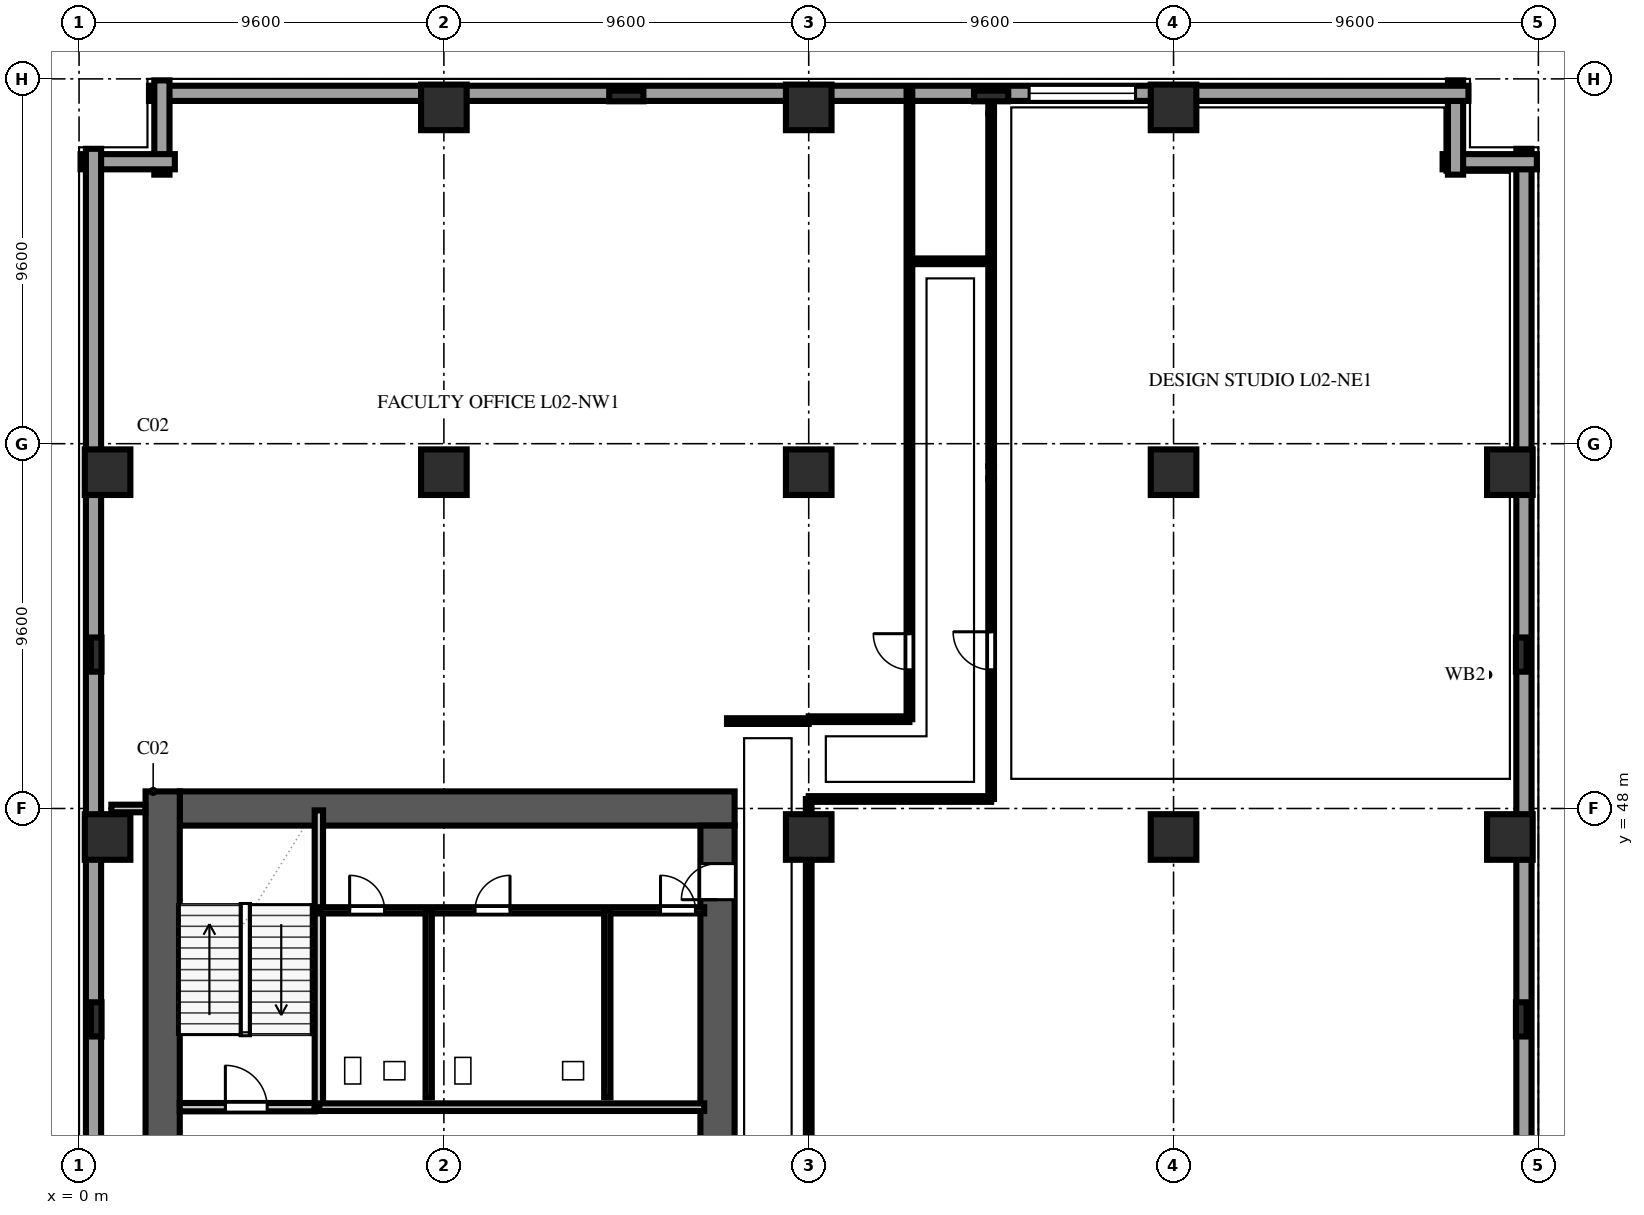
"""IFC4 building model, lengths in metres.
Left out: names, types, materials, properties, quantities, classifications, styles, units other than length and angle.
Written with IfcOpenShell. Run it as: python <this file> out.ifc"""

import sys

from ifc_helpers import new_model, si_unit, direction, frame, frame_2d, origin, origin_2d, place, context, subcontext, project, spatial, rectangle, extrude, element, fill, save


model = new_model("IFC4")
c1 = context("Model", 3, precision=1e-05, world=origin(), true_north=direction((0.0, 1.0)))
c2 = subcontext(c1, "Body", "Model", "MODEL_VIEW")
j1 = project(units=[si_unit("LENGTHUNIT", "METRE"), si_unit("PLANEANGLEUNIT", "RADIAN")], contexts=[c1])
p1 = place(None, origin())
s1 = spatial("IfcSite", under=j1, at=p1, CompositionType="ELEMENT")
p2 = place(p1, origin())
s2 = spatial("IfcBuilding", under=s1, at=p2, CompositionType="ELEMENT")
p3 = place(p2, frame((0.0, 0.0, 10.4)))
s3 = spatial("IfcBuildingStorey", under=s2, at=p3, CompositionType="ELEMENT", Elevation=10.4)
p4 = place(p3, frame((2.65, 48.0, 0.0), z_axis=(0.0, 0.0, 1.0), x_axis=(1.0, 0.0, 0.0)))
e1 = element("IfcWall", 1, at=p4, inside=s3, PredefinedType="SHEAR", context=c2, shape_type="SweptSolid", body=[
    extrude(rectangle(XDim=14.6, YDim=0.9, at=frame_2d((7.3, 0.0))), origin(), (0.0, 0.0, 1.0), 4.26),
])
p5 = place(p3, frame((2.2, 9.15, 0.0), z_axis=(0.0, 0.0, 1.0), x_axis=(0.0, 1.0, 0.0)))
e2 = element("IfcWall", 2, at=p5, inside=s3, PredefinedType="SHEAR", context=c2, shape_type="SweptSolid", body=[
    extrude(rectangle(XDim=39.3, YDim=0.9, at=frame_2d((19.65, 0.0))), origin(), (0.0, 0.0, 1.0), 4.26),
])
p6 = place(p3, frame((16.8, 36.4, 0.0), z_axis=(0.0, 0.0, 1.0), x_axis=(0.0, 1.0, 0.0)))
e3 = element("IfcWall", 3, at=p6, inside=s3, PredefinedType="SHEAR", context=c2, shape_type="SweptSolid", body=[
    extrude(rectangle(XDim=11.15, YDim=0.9, at=frame_2d((5.575, 0.0))), origin(), (0.0, 0.0, 1.0), 4.26),
])
p7 = place(p6, frame((9.2, 0.0, 0.0)))
e4 = element("IfcOpeningElement", 4, at=p7, cuts=e3, PredefinedType="OPENING", context=c2, shape_type="SweptSolid", body=[
    extrude(rectangle(XDim=0.95, YDim=2.15, at=frame_2d((0.475, 1.075))), frame((0.0, 0.462, 0.0), z_axis=(0.0, -1.0, 0.0), x_axis=(1.0, 0.0, 0.0)), (0.0, 0.0, 1.0), 0.924),
])
for number, where, z_axis, x_axis in (
    (5, (0.75, 47.25, 0.0), (0.0, 0.0, 1.0), (1.0, 0.0, 0.0)),
    (6, (0.75, 56.85, 0.0), (0.0, 0.0, 1.0), (1.0, 0.0, 0.0)),
    (7, (9.6, 56.85, 0.0), (0.0, 0.0, 1.0), (1.0, 0.0, 0.0)),
    (8, (9.6, 66.45, 0.0), (0.0, 0.0, 1.0), (1.0, 0.0, 0.0)),
    (9, (19.2, 47.25, 0.0), (0.0, 0.0, 1.0), (1.0, 0.0, 0.0)),
    (10, (19.2, 56.85, 0.0), (0.0, 0.0, 1.0), (1.0, 0.0, 0.0)),
    (11, (19.2, 66.45, 0.0), (0.0, 0.0, 1.0), (1.0, 0.0, 0.0)),
    (12, (28.8, 47.25, 0.0), (0.0, 0.0, 1.0), (1.0, 0.0, 0.0)),
    (13, (28.8, 56.85, 0.0), (0.0, 0.0, 1.0), (1.0, 0.0, 0.0)),
    (14, (28.8, 66.45, 0.0), (0.0, 0.0, 1.0), (1.0, 0.0, 0.0)),
    (15, (37.65, 47.25, 0.0), (0.0, 0.0, 1.0), (1.0, 0.0, 0.0)),
    (16, (37.65, 56.85, 0.0), (0.0, 0.0, 1.0), (1.0, 0.0, 0.0)),
):
    element("IfcColumn", number, at=place(p3, frame(where, z_axis=z_axis, x_axis=x_axis)), inside=s3, PredefinedType="COLUMN", context=c2, shape_type="SweptSolid", body=[
        extrude(rectangle(XDim=1.2, YDim=1.2, at=origin_2d()), origin(), (0.0, 0.0, 1.0), 4.6),
    ])
for number, where, z_axis, x_axis in (
    (17, (0.45, 42.45, 0.0), (0.0, 0.0, 1.0), (0.0, 1.0, 0.0)),
    (18, (0.45, 52.05, 0.0), (0.0, 0.0, 1.0), (0.0, 1.0, 0.0)),
    (19, (14.4, 66.75, 0.0), (0.0, 0.0, 1.0), (1.0, 0.0, 0.0)),
    (20, (24.0, 66.75, 0.0), (0.0, 0.0, 1.0), (1.0, 0.0, 0.0)),
    (21, (37.95, 42.45, 0.0), (0.0, 0.0, 1.0), (0.0, 1.0, 0.0)),
    (22, (37.95, 52.05, 0.0), (0.0, 0.0, 1.0), (0.0, 1.0, 0.0)),
):
    element("IfcColumn", number, at=place(p3, frame(where, z_axis=z_axis, x_axis=x_axis)), inside=s3, PredefinedType="PILASTER", context=c2, shape_type="SweptSolid", body=[
        extrude(rectangle(XDim=0.9, YDim=0.28, at=origin_2d()), origin(), (0.0, 0.0, 1.0), 4.6),
    ])
p8 = place(p3, frame((38.02, 37.68, 0.0), z_axis=(0.0, 0.0, 1.0), x_axis=(0.0, 1.0, 0.0)))
e23 = element("IfcWall", 23, at=p8, inside=s3, PredefinedType="SOLIDWALL", context=c2, shape_type="SweptSolid", body=[
    extrude(rectangle(XDim=27.68, YDim=0.4, at=frame_2d((13.84, 0.0))), origin(), (0.0, 0.0, 1.0), 4.26),
])
p9 = place(p3, frame((38.36, 65.02, 0.0), z_axis=(0.0, 0.0, 1.0), x_axis=(-1.0, 0.0, 0.0)))
e24 = element("IfcWall", 24, at=p9, inside=s3, PredefinedType="SOLIDWALL", context=c2, shape_type="SweptSolid", body=[
    extrude(rectangle(XDim=2.48, YDim=0.4, at=frame_2d((1.24, 0.0))), origin(), (0.0, 0.0, 1.0), 4.26),
])
p10 = place(p3, frame((36.22, 64.68, 0.0), z_axis=(0.0, 0.0, 1.0), x_axis=(0.0, 1.0, 0.0)))
e25 = element("IfcWall", 25, at=p10, inside=s3, PredefinedType="SOLIDWALL", context=c2, shape_type="SweptSolid", body=[
    extrude(rectangle(XDim=2.48, YDim=0.4, at=frame_2d((1.24, 0.0))), origin(), (0.0, 0.0, 1.0), 4.26),
])
p11 = place(p3, frame((36.56, 66.82, 0.0), z_axis=(0.0, 0.0, 1.0), x_axis=(-1.0, 0.0, 0.0)))
e26 = element("IfcWall", 26, at=p11, inside=s3, PredefinedType="SOLIDWALL", context=c2, shape_type="SweptSolid", body=[
    extrude(rectangle(XDim=34.72, YDim=0.4, at=frame_2d((17.36, 0.0))), origin(), (0.0, 0.0, 1.0), 4.26),
])
p12 = place(p11, frame((8.76, 0.0, 0.75)))
e27 = element("IfcOpeningElement", 27, at=p12, cuts=e26, PredefinedType="OPENING", context=c2, shape_type="SweptSolid", body=[
    extrude(rectangle(XDim=2.8, YDim=2.3, at=frame_2d((1.4, 1.15))), frame((0.0, 0.212, 0.0), z_axis=(0.0, -1.0, 0.0), x_axis=(1.0, 0.0, 0.0)), (0.0, 0.0, 1.0), 0.424),
])
for number, where, z_axis, x_axis in (
    (28, (2.18, 67.16, 0.0), (0.0, 0.0, 1.0), (0.0, -1.0, 0.0)),
    (29, (2.52, 65.02, 0.0), (0.0, 0.0, 1.0), (-1.0, 0.0, 0.0)),
):
    element("IfcWall", number, at=place(p3, frame(where, z_axis=z_axis, x_axis=x_axis)), inside=s3, PredefinedType="SOLIDWALL", context=c2, shape_type="SweptSolid", body=[
        extrude(rectangle(XDim=2.48, YDim=0.4, at=frame_2d((1.24, 0.0))), origin(), (0.0, 0.0, 1.0), 4.26),
    ])
p13 = place(p3, frame((0.38, 65.36, 0.0), z_axis=(0.0, 0.0, 1.0), x_axis=(0.0, -1.0, 0.0)))
e30 = element("IfcWall", 30, at=p13, inside=s3, PredefinedType="SOLIDWALL", context=c2, shape_type="SweptSolid", body=[
    extrude(rectangle(XDim=63.52, YDim=0.4, at=frame_2d((31.76, 0.0))), origin(), (0.0, 0.0, 1.0), 4.26),
])
p14 = place(p13, frame((32.76, 0.0, 0.75)))
e31 = element("IfcOpeningElement", 31, at=p14, cuts=e30, PredefinedType="OPENING", context=c2, shape_type="SweptSolid", body=[
    extrude(rectangle(XDim=2.8, YDim=2.3, at=frame_2d((1.4, 1.15))), frame((0.0, 0.212, 0.0), z_axis=(0.0, -1.0, 0.0), x_axis=(1.0, 0.0, 0.0)), (0.0, 0.0, 1.0), 0.424),
])
p15 = place(p13, frame((37.56, 0.0, 0.75)))
e32 = element("IfcOpeningElement", 32, at=p15, cuts=e30, PredefinedType="OPENING", context=c2, shape_type="SweptSolid", body=[
    extrude(rectangle(XDim=2.8, YDim=2.3, at=frame_2d((1.4, 1.15))), frame((0.0, 0.212, 0.0), z_axis=(0.0, -1.0, 0.0), x_axis=(1.0, 0.0, 0.0)), (0.0, 0.0, 1.0), 0.424),
])
p16 = place(p13, frame((42.36, 0.0, 0.75)))
e33 = element("IfcOpeningElement", 33, at=p16, cuts=e30, PredefinedType="OPENING", context=c2, shape_type="SweptSolid", body=[
    extrude(rectangle(XDim=2.8, YDim=2.3, at=frame_2d((1.4, 1.15))), frame((0.0, 0.212, 0.0), z_axis=(0.0, -1.0, 0.0), x_axis=(1.0, 0.0, 0.0)), (0.0, 0.0, 1.0), 0.424),
])
p17 = place(p13, frame((47.16, 0.0, 0.75)))
e34 = element("IfcOpeningElement", 34, at=p17, cuts=e30, PredefinedType="OPENING", context=c2, shape_type="SweptSolid", body=[
    extrude(rectangle(XDim=2.8, YDim=2.3, at=frame_2d((1.4, 1.15))), frame((0.0, 0.212, 0.0), z_axis=(0.0, -1.0, 0.0), x_axis=(1.0, 0.0, 0.0)), (0.0, 0.0, 1.0), 0.424),
])
p18 = place(p13, frame((51.96, 0.0, 0.75)))
e35 = element("IfcOpeningElement", 35, at=p18, cuts=e30, PredefinedType="OPENING", context=c2, shape_type="SweptSolid", body=[
    extrude(rectangle(XDim=2.8, YDim=2.3, at=frame_2d((1.4, 1.15))), frame((0.0, 0.212, 0.0), z_axis=(0.0, -1.0, 0.0), x_axis=(1.0, 0.0, 0.0)), (0.0, 0.0, 1.0), 0.424),
])
p19 = place(p3, frame((2.65, 40.14, 0.0), z_axis=(0.0, 0.0, 1.0), x_axis=(1.0, 0.0, 0.0)))
e36 = element("IfcWall", 36, at=p19, inside=s3, PredefinedType="SOLIDWALL", context=c2, shape_type="SweptSolid", body=[
    extrude(rectangle(XDim=3.55, YDim=0.22, at=frame_2d((1.775, 0.0))), origin(), (0.0, 0.0, 1.0), 4.26),
])
p20 = place(p19, frame((1.2, 0.0, 0.0)))
e37 = element("IfcOpeningElement", 37, at=p20, cuts=e36, PredefinedType="OPENING", context=c2, shape_type="SweptSolid", body=[
    extrude(rectangle(XDim=1.1, YDim=2.2, at=frame_2d((0.55, 1.1))), frame((0.0, 0.122, 0.0), z_axis=(0.0, -1.0, 0.0), x_axis=(1.0, 0.0, 0.0)), (0.0, 0.0, 1.0), 0.244),
])
p21 = place(p3, frame((6.31, 40.14, 0.0), z_axis=(0.0, 0.0, 1.0), x_axis=(0.0, 1.0, 0.0)))
e38 = element("IfcWall", 38, at=p21, inside=s3, PredefinedType="SOLIDWALL", context=c2, shape_type="SweptSolid", body=[
    extrude(rectangle(XDim=7.81, YDim=0.22, at=frame_2d((3.905, 0.0))), origin(), (0.0, 0.0, 1.0), 4.26),
])
p22 = place(p3, frame((6.32, 40.14, 0.0), z_axis=(0.0, 0.0, 1.0), x_axis=(1.0, 0.0, 0.0)))
e39 = element("IfcWall", 39, at=p22, inside=s3, PredefinedType="SOLIDWALL", context=c2, shape_type="SweptSolid", body=[
    extrude(rectangle(XDim=10.13, YDim=0.2, at=frame_2d((5.065, 0.0))), origin(), (0.0, 0.0, 1.0), 4.26),
])
p23 = place(p3, frame((6.32, 45.32, 0.0), z_axis=(0.0, 0.0, 1.0), x_axis=(1.0, 0.0, 0.0)))
e40 = element("IfcWall", 40, at=p23, inside=s3, PredefinedType="PLUMBINGWALL", context=c2, shape_type="SweptSolid", body=[
    extrude(rectangle(XDim=10.13, YDim=0.165, at=frame_2d((5.065, 0.0))), origin(), (0.0, 0.0, 1.0), 4.26),
])
p24 = place(p23, frame((0.8, 0.0, 0.0)))
e41 = element("IfcOpeningElement", 41, at=p24, cuts=e40, PredefinedType="OPENING", context=c2, shape_type="SweptSolid", body=[
    extrude(rectangle(XDim=0.92, YDim=2.15, at=frame_2d((0.46, 1.075))), frame((0.0, 0.094, 0.0), z_axis=(0.0, -1.0, 0.0), x_axis=(1.0, 0.0, 0.0)), (0.0, 0.0, 1.0), 0.189),
])
p25 = place(p23, frame((4.1, 0.0, 0.0)))
e42 = element("IfcOpeningElement", 42, at=p25, cuts=e40, PredefinedType="OPENING", context=c2, shape_type="SweptSolid", body=[
    extrude(rectangle(XDim=0.92, YDim=2.15, at=frame_2d((0.46, 1.075))), frame((0.0, 0.094, 0.0), z_axis=(0.0, -1.0, 0.0), x_axis=(1.0, 0.0, 0.0)), (0.0, 0.0, 1.0), 0.189),
])
p26 = place(p23, frame((8.98, 0.0, 0.0)))
e43 = element("IfcOpeningElement", 43, at=p26, cuts=e40, PredefinedType="OPENING", context=c2, shape_type="SweptSolid", body=[
    extrude(rectangle(XDim=0.92, YDim=2.15, at=frame_2d((0.46, 1.075))), frame((0.0, 0.094, 0.0), z_axis=(0.0, -1.0, 0.0), x_axis=(1.0, 0.0, 0.0)), (0.0, 0.0, 1.0), 0.189),
])
for number, where, z_axis, x_axis in (
    (44, (9.2, 40.4, 0.0), (0.0, 0.0, 1.0), (0.0, 1.0, 0.0)),
    (45, (13.9, 40.4, 0.0), (0.0, 0.0, 1.0), (0.0, 1.0, 0.0)),
):
    element("IfcWall", number, at=place(p3, frame(where, z_axis=z_axis, x_axis=x_axis)), inside=s3, PredefinedType="PLUMBINGWALL", context=c2, shape_type="SweptSolid", body=[
        extrude(rectangle(XDim=4.92, YDim=0.165, at=frame_2d((2.46, 0.0))), origin(), (0.0, 0.0, 1.0), 4.26),
    ])
p27 = place(p3, frame((0.85, 48.0, 0.0), z_axis=(0.0, 0.0, 1.0), x_axis=(1.0, 0.0, 0.0)))
e46 = element("IfcWall", 46, at=p27, inside=s3, PredefinedType="SOLIDWALL", context=c2, shape_type="SweptSolid", body=[
    extrude(rectangle(XDim=0.895, YDim=0.2, at=frame_2d((0.448, 0.0))), origin(), (0.0, 0.0, 1.0), 4.26),
])
p28 = place(p3, frame((17.05, 50.3, 0.0), z_axis=(0.0, 0.0, 1.0), x_axis=(1.0, 0.0, 0.0)))
e47 = element("IfcWall", 47, at=p28, inside=s3, PredefinedType="PARTITIONING", context=c2, shape_type="SweptSolid", body=[
    extrude(rectangle(XDim=2.15, YDim=0.15, at=frame_2d((1.075, 0.0))), origin(), (0.0, 0.0, 1.0), 4.26),
])
p29 = place(p3, frame((19.2, 23.45, 0.0), z_axis=(0.0, 0.0, 1.0), x_axis=(0.0, 1.0, 0.0)))
e48 = element("IfcWall", 48, at=p29, inside=s3, PredefinedType="PARTITIONING", context=c2, shape_type="SweptSolid", body=[
    extrude(rectangle(XDim=24.8, YDim=0.15, at=frame_2d((12.4, 0.0))), origin(), (0.0, 0.0, 1.0), 3.644),
])
p30 = place(p29, frame((9.35, 0.0, 0.0)))
e49 = element("IfcOpeningElement", 49, at=p30, cuts=e48, PredefinedType="OPENING", context=c2, shape_type="SweptSolid", body=[
    extrude(rectangle(XDim=0.95, YDim=2.15, at=frame_2d((0.475, 1.075))), frame((0.0, 0.087, 0.0), z_axis=(0.0, -1.0, 0.0), x_axis=(1.0, 0.0, 0.0)), (0.0, 0.0, 1.0), 0.174),
])
p31 = place(p3, frame((19.2, 48.25, 0.0), z_axis=(0.0, 0.0, 1.0), x_axis=(1.0, 0.0, 0.0)))
e50 = element("IfcWall", 50, at=p31, inside=s3, PredefinedType="PARTITIONING", context=c2, shape_type="SweptSolid", body=[
    extrude(rectangle(XDim=4.8, YDim=0.15, at=frame_2d((2.4, 0.0))), origin(), (0.0, 0.0, 1.0), 4.26),
])
p32 = place(p3, frame((19.2, 50.35, 0.0), z_axis=(0.0, 0.0, 1.0), x_axis=(1.0, 0.0, 0.0)))
e51 = element("IfcWall", 51, at=p32, inside=s3, PredefinedType="PARTITIONING", context=c2, shape_type="SweptSolid", body=[
    extrude(rectangle(XDim=2.65, YDim=0.15, at=frame_2d((1.325, 0.0))), origin(), (0.0, 0.0, 1.0), 4.26),
])
p33 = place(p3, frame((21.85, 62.4, 0.0), z_axis=(0.0, 0.0, 1.0), x_axis=(1.0, 0.0, 0.0)))
e52 = element("IfcWall", 52, at=p33, inside=s3, PredefinedType="PARTITIONING", context=c2, shape_type="SweptSolid", body=[
    extrude(rectangle(XDim=2.15, YDim=0.15, at=frame_2d((1.075, 0.0))), origin(), (0.0, 0.0, 1.0), 4.26),
])
p34 = place(p3, frame((24.0, 48.25, 0.0), z_axis=(0.0, 0.0, 1.0), x_axis=(0.0, 1.0, 0.0)))
e53 = element("IfcWall", 53, at=p34, inside=s3, PredefinedType="PARTITIONING", context=c2, shape_type="SweptSolid", body=[
    extrude(rectangle(XDim=8.438, YDim=0.15, at=frame_2d((4.219, 0.0))), origin(), (0.0, 0.0, 1.0), 3.716),
])
p35 = place(p34, frame((3.4, 0.0, 0.0)))
e54 = element("IfcOpeningElement", 54, at=p35, cuts=e53, PredefinedType="OPENING", context=c2, shape_type="SweptSolid", body=[
    extrude(rectangle(XDim=1.0, YDim=2.2, at=frame_2d((0.5, 1.1))), frame((0.0, 0.087, 0.0), z_axis=(0.0, -1.0, 0.0), x_axis=(1.0, 0.0, 0.0)), (0.0, 0.0, 1.0), 0.174),
])
p36 = place(p3, frame((24.0, 56.688, 0.0), z_axis=(0.0, 0.0, 1.0), x_axis=(0.0, 1.0, 0.0)))
e55 = element("IfcWall", 55, at=p36, inside=s3, PredefinedType="PARTITIONING", context=c2, shape_type="SweptSolid", body=[
    extrude(rectangle(XDim=0.325, YDim=0.15, at=frame_2d((0.163, 0.0))), origin(), (0.0, 0.0, 1.0), 4.26),
])
p37 = place(p3, frame((24.0, 57.012, 0.0), z_axis=(0.0, 0.0, 1.0), x_axis=(0.0, 1.0, 0.0)))
e56 = element("IfcWall", 56, at=p37, inside=s3, PredefinedType="PARTITIONING", context=c2, shape_type="SweptSolid", body=[
    extrude(rectangle(XDim=9.275, YDim=0.15, at=frame_2d((4.638, 0.0))), origin(), (0.0, 0.0, 1.0), 3.716),
])
p38 = place(p3, frame((24.0, 66.288, 0.0), z_axis=(0.0, 0.0, 1.0), x_axis=(0.0, 1.0, 0.0)))
e57 = element("IfcWall", 57, at=p38, inside=s3, PredefinedType="PARTITIONING", context=c2, shape_type="SweptSolid", body=[
    extrude(rectangle(XDim=0.692, YDim=0.15, at=frame_2d((0.346, 0.0))), origin(), (0.0, 0.0, 1.0), 4.26),
])
p39 = place(p3, frame((21.85, 50.35, 0.0), z_axis=(0.0, 0.0, 1.0), x_axis=(0.0, 1.0, 0.0)))
e58 = element("IfcWall", 58, at=p39, inside=s3, PredefinedType="PARTITIONING", context=c2, shape_type="SweptSolid", body=[
    extrude(rectangle(XDim=16.63, YDim=0.15, at=frame_2d((8.315, 0.0))), origin(), (0.0, 0.0, 1.0), 4.26),
])
p40 = place(p39, frame((1.3, 0.0, 0.0)))
e59 = element("IfcOpeningElement", 59, at=p40, cuts=e58, PredefinedType="OPENING", context=c2, shape_type="SweptSolid", body=[
    extrude(rectangle(XDim=0.95, YDim=2.15, at=frame_2d((0.475, 1.075))), frame((0.0, 0.087, 0.0), z_axis=(0.0, -1.0, 0.0), x_axis=(1.0, 0.0, 0.0)), (0.0, 0.0, 1.0), 0.174),
])
p41 = place(p12, origin())
e60 = element("IfcWindow", 60, at=p41, inside=s3, PartitioningType="TRIPLE_PANEL_VERTICAL", PredefinedType="WINDOW", context=c2, shape_type="SweptSolid", body=[
    extrude(rectangle(XDim=2.8, YDim=2.3, at=frame_2d((1.4, 1.15))), frame((0.0, 0.11, 0.0), z_axis=(0.0, -1.0, 0.0), x_axis=(1.0, 0.0, 0.0)), (0.0, 0.0, 1.0), 0.06),
])
fill(e27, e60)
p42 = place(p20, origin())
e61 = element("IfcDoor", 61, at=p42, inside=s3, OperationType="SINGLE_SWING_LEFT", PredefinedType="DOOR", context=c2, shape_type="SweptSolid", body=[
    extrude(rectangle(XDim=1.1, YDim=2.2, at=frame_2d((0.55, 1.1))), frame((0.0, 0.025, 0.0), z_axis=(0.0, -1.0, 0.0), x_axis=(1.0, 0.0, 0.0)), (0.0, 0.0, 1.0), 0.05),
])
fill(e37, e61)
p43 = place(p7, origin())
e62 = element("IfcDoor", 62, at=p43, inside=s3, OperationType="SINGLE_SWING_LEFT", PredefinedType="DOOR", context=c2, shape_type="SweptSolid", body=[
    extrude(rectangle(XDim=0.95, YDim=2.15, at=frame_2d((0.475, 1.075))), frame((0.0, 0.025, 0.0), z_axis=(0.0, -1.0, 0.0), x_axis=(1.0, 0.0, 0.0)), (0.0, 0.0, 1.0), 0.05),
])
fill(e4, e62)
p44 = place(p24, origin())
e63 = element("IfcDoor", 63, at=p44, inside=s3, OperationType="SINGLE_SWING_LEFT", PredefinedType="DOOR", context=c2, shape_type="SweptSolid", body=[
    extrude(rectangle(XDim=0.92, YDim=2.15, at=frame_2d((0.46, 1.075))), frame((0.0, 0.025, 0.0), z_axis=(0.0, -1.0, 0.0), x_axis=(1.0, 0.0, 0.0)), (0.0, 0.0, 1.0), 0.05),
])
fill(e41, e63)
p45 = place(p25, origin())
e64 = element("IfcDoor", 64, at=p45, inside=s3, OperationType="SINGLE_SWING_RIGHT", PredefinedType="DOOR", context=c2, shape_type="SweptSolid", body=[
    extrude(rectangle(XDim=0.92, YDim=2.15, at=frame_2d((0.46, 1.075))), frame((0.0, 0.025, 0.0), z_axis=(0.0, -1.0, 0.0), x_axis=(1.0, 0.0, 0.0)), (0.0, 0.0, 1.0), 0.05),
])
fill(e42, e64)
p46 = place(p26, origin())
e65 = element("IfcDoor", 65, at=p46, inside=s3, OperationType="SINGLE_SWING_LEFT", PredefinedType="DOOR", context=c2, shape_type="SweptSolid", body=[
    extrude(rectangle(XDim=0.92, YDim=2.15, at=frame_2d((0.46, 1.075))), frame((0.0, 0.025, 0.0), z_axis=(0.0, -1.0, 0.0), x_axis=(1.0, 0.0, 0.0)), (0.0, 0.0, 1.0), 0.05),
])
fill(e43, e65)
p47 = place(p35, origin())
e66 = element("IfcDoor", 66, at=p47, inside=s3, OperationType="SINGLE_SWING_RIGHT", PredefinedType="DOOR", context=c2, shape_type="SweptSolid", body=[
    extrude(rectangle(XDim=1.0, YDim=2.2, at=frame_2d((0.5, 1.1))), frame((0.0, 0.025, 0.0), z_axis=(0.0, -1.0, 0.0), x_axis=(1.0, 0.0, 0.0)), (0.0, 0.0, 1.0), 0.05),
])
fill(e54, e66)
p48 = place(p40, origin())
e67 = element("IfcDoor", 67, at=p48, inside=s3, OperationType="SINGLE_SWING_RIGHT", PredefinedType="DOOR", context=c2, shape_type="SweptSolid", body=[
    extrude(rectangle(XDim=0.95, YDim=2.15, at=frame_2d((0.475, 1.075))), frame((0.0, 0.025, 0.0), z_axis=(0.0, -1.0, 0.0), x_axis=(1.0, 0.0, 0.0)), (0.0, 0.0, 1.0), 0.05),
])
fill(e59, e67)
save(model, sys.argv[1])
